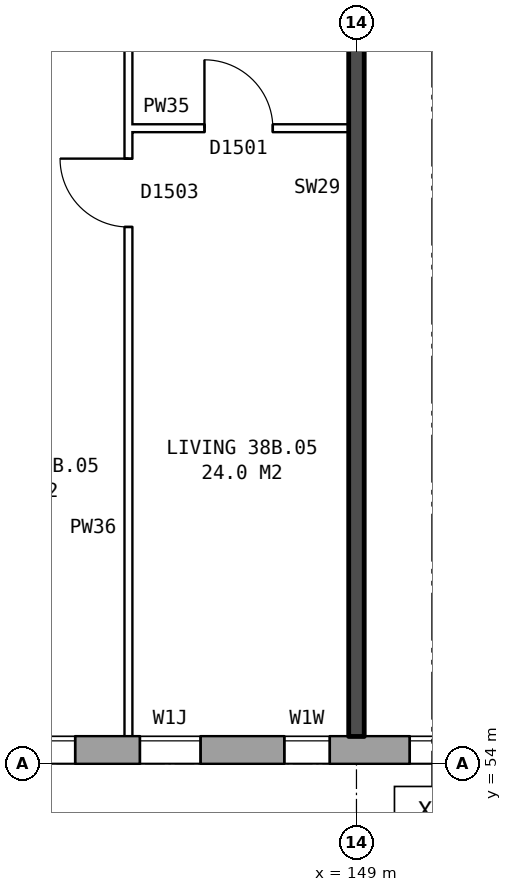
"""IFC4 building model, lengths in metres.
Left out: names, types, materials, properties, quantities, classifications, styles, units other than length and angle.
Written with IfcOpenShell. Run it as: python <this file> out.ifc"""

import sys

from ifc_helpers import new_model, si_unit, direction, frame, frame_2d, origin, place, context, subcontext, project, spatial, rectangle, extrude, element, fill, save


model = new_model("IFC4")
c1 = context("Model", 3, precision=1e-05, world=origin(), true_north=direction((0.0, 1.0)))
c2 = subcontext(c1, "Body", "Model", "MODEL_VIEW")
j1 = project(units=[si_unit("LENGTHUNIT", "METRE"), si_unit("PLANEANGLEUNIT", "RADIAN")], contexts=[c1])
p1 = place(None, origin())
s1 = spatial("IfcSite", under=j1, at=p1, CompositionType="ELEMENT")
p2 = place(p1, origin())
s2 = spatial("IfcBuilding", under=s1, at=p2, CompositionType="ELEMENT")
p3 = place(p2, frame((0.0, 0.0, 136.1)))
s3 = spatial("IfcBuildingStorey", under=s2, at=p3, CompositionType="ELEMENT", Elevation=136.1)
p4 = place(p3, frame((134.075, 54.18, 0.0), z_axis=(0.0, 0.0, 1.0), x_axis=(1.0, 0.0, 0.0)))
e1 = element("IfcWall", 1, at=p4, inside=s3, PredefinedType="STANDARD", context=c2, shape_type="SweptSolid", body=[
    extrude(rectangle(XDim=35.601, YDim=0.36, at=frame_2d((17.8, 0.0))), origin(), (0.0, 0.0, 1.0), 2.85),
])
p5 = place(p4, frame((0.625, 0.0, 0.8)))
e2 = element("IfcOpeningElement", 2, at=p5, cuts=e1, PredefinedType="OPENING", context=c2, shape_type="SweptSolid", body=[
    extrude(rectangle(XDim=1.6, YDim=1.8, at=frame_2d((0.8, 0.9))), frame((0.0, 0.19, 0.0), z_axis=(0.0, -1.0, 0.0), x_axis=(1.0, 0.0, 0.0)), (0.0, 0.0, 1.0), 0.38),
])
p6 = place(p4, frame((3.625, 0.0, 0.8)))
e3 = element("IfcOpeningElement", 3, at=p6, cuts=e1, PredefinedType="OPENING", context=c2, shape_type="SweptSolid", body=[
    extrude(rectangle(XDim=1.6, YDim=1.8, at=frame_2d((0.8, 0.9))), frame((0.0, 0.19, 0.0), z_axis=(0.0, -1.0, 0.0), x_axis=(1.0, 0.0, 0.0)), (0.0, 0.0, 1.0), 0.38),
])
p7 = place(p4, frame((6.625, 0.0, 0.8)))
e4 = element("IfcOpeningElement", 4, at=p7, cuts=e1, PredefinedType="OPENING", context=c2, shape_type="SweptSolid", body=[
    extrude(rectangle(XDim=1.6, YDim=1.8, at=frame_2d((0.8, 0.9))), frame((0.0, 0.19, 0.0), z_axis=(0.0, -1.0, 0.0), x_axis=(1.0, 0.0, 0.0)), (0.0, 0.0, 1.0), 0.38),
])
p8 = place(p4, frame((9.625, 0.0, 0.8)))
e5 = element("IfcOpeningElement", 5, at=p8, cuts=e1, PredefinedType="OPENING", context=c2, shape_type="SweptSolid", body=[
    extrude(rectangle(XDim=1.6, YDim=1.8, at=frame_2d((0.8, 0.9))), frame((0.0, 0.19, 0.0), z_axis=(0.0, -1.0, 0.0), x_axis=(1.0, 0.0, 0.0)), (0.0, 0.0, 1.0), 0.38),
])
p9 = place(p4, frame((12.075, 0.0, 1.05)))
e6 = element("IfcOpeningElement", 6, at=p9, cuts=e1, PredefinedType="OPENING", context=c2, shape_type="SweptSolid", body=[
    extrude(rectangle(XDim=0.8, YDim=1.5, at=frame_2d((0.4, 0.75))), frame((0.0, 0.19, 0.0), z_axis=(0.0, -1.0, 0.0), x_axis=(1.0, 0.0, 0.0)), (0.0, 0.0, 1.0), 0.38),
])
p10 = place(p4, frame((15.625, 0.0, 0.8)))
e7 = element("IfcOpeningElement", 7, at=p10, cuts=e1, PredefinedType="OPENING", context=c2, shape_type="SweptSolid", body=[
    extrude(rectangle(XDim=1.6, YDim=1.8, at=frame_2d((0.8, 0.9))), frame((0.0, 0.19, 0.0), z_axis=(0.0, -1.0, 0.0), x_axis=(1.0, 0.0, 0.0)), (0.0, 0.0, 1.0), 0.38),
])
p11 = place(p4, frame((18.625, 0.0, 0.8)))
e8 = element("IfcOpeningElement", 8, at=p11, cuts=e1, PredefinedType="OPENING", context=c2, shape_type="SweptSolid", body=[
    extrude(rectangle(XDim=1.6, YDim=1.8, at=frame_2d((0.8, 0.9))), frame((0.0, 0.19, 0.0), z_axis=(0.0, -1.0, 0.0), x_axis=(1.0, 0.0, 0.0)), (0.0, 0.0, 1.0), 0.38),
])
p12 = place(p4, frame((22.125, 0.0, 1.7)))
e9 = element("IfcOpeningElement", 9, at=p12, cuts=e1, PredefinedType="OPENING", context=c2, shape_type="SweptSolid", body=[
    extrude(rectangle(XDim=0.6, YDim=0.9, at=frame_2d((0.3, 0.45))), frame((0.0, 0.19, 0.0), z_axis=(0.0, -1.0, 0.0), x_axis=(1.0, 0.0, 0.0)), (0.0, 0.0, 1.0), 0.38),
])
p13 = place(p4, frame((24.625, 0.0, 0.8)))
e10 = element("IfcOpeningElement", 10, at=p13, cuts=e1, PredefinedType="OPENING", context=c2, shape_type="SweptSolid", body=[
    extrude(rectangle(XDim=1.6, YDim=1.8, at=frame_2d((0.8, 0.9))), frame((0.0, 0.19, 0.0), z_axis=(0.0, -1.0, 0.0), x_axis=(1.0, 0.0, 0.0)), (0.0, 0.0, 1.0), 0.38),
])
p14 = place(p4, frame((27.625, 0.0, 0.8)))
e11 = element("IfcOpeningElement", 11, at=p14, cuts=e1, PredefinedType="OPENING", context=c2, shape_type="SweptSolid", body=[
    extrude(rectangle(XDim=1.6, YDim=1.8, at=frame_2d((0.8, 0.9))), frame((0.0, 0.19, 0.0), z_axis=(0.0, -1.0, 0.0), x_axis=(1.0, 0.0, 0.0)), (0.0, 0.0, 1.0), 0.38),
])
p15 = place(p4, frame((30.625, 0.0, 0.8)))
e12 = element("IfcOpeningElement", 12, at=p15, cuts=e1, PredefinedType="OPENING", context=c2, shape_type="SweptSolid", body=[
    extrude(rectangle(XDim=1.6, YDim=1.8, at=frame_2d((0.8, 0.9))), frame((0.0, 0.19, 0.0), z_axis=(0.0, -1.0, 0.0), x_axis=(1.0, 0.0, 0.0)), (0.0, 0.0, 1.0), 0.38),
])
p16 = place(p4, frame((33.625, 0.0, 0.8)))
e13 = element("IfcOpeningElement", 13, at=p16, cuts=e1, PredefinedType="OPENING", context=c2, shape_type="SweptSolid", body=[
    extrude(rectangle(XDim=1.6, YDim=1.8, at=frame_2d((0.8, 0.9))), frame((0.0, 0.19, 0.0), z_axis=(0.0, -1.0, 0.0), x_axis=(1.0, 0.0, 0.0)), (0.0, 0.0, 1.0), 0.38),
])
p17 = place(p4, frame((13.975, 0.0, 0.15)))
e14 = element("IfcOpeningElement", 14, at=p17, cuts=e1, PredefinedType="OPENING", context=c2, shape_type="SweptSolid", body=[
    extrude(rectangle(XDim=0.6, YDim=0.9, at=frame_2d((0.3, 0.45))), frame((0.0, 0.19, 0.0), z_axis=(0.0, -1.0, 0.0), x_axis=(1.0, 0.0, 0.0)), (0.0, 0.0, 1.0), 0.38),
])
p18 = place(p4, frame((23.025, 0.0, 0.8)))
e15 = element("IfcOpeningElement", 15, at=p18, cuts=e1, PredefinedType="OPENING", context=c2, shape_type="SweptSolid", body=[
    extrude(rectangle(XDim=1.2, YDim=1.8, at=frame_2d((0.6, 0.9))), frame((0.0, 0.19, 0.0), z_axis=(0.0, -1.0, 0.0), x_axis=(1.0, 0.0, 0.0)), (0.0, 0.0, 1.0), 0.38),
])
p19 = place(p3, frame((146.0, 62.36, 0.0), z_axis=(0.0, 0.0, 1.0), x_axis=(1.0, 0.0, 0.0)))
e16 = element("IfcWall", 16, at=p19, inside=s3, PredefinedType="PARTITIONING", context=c2, shape_type="SweptSolid", body=[
    extrude(rectangle(XDim=2.9, YDim=0.1, at=frame_2d((1.45, 0.0))), origin(), (0.0, 0.0, 1.0), 2.85),
])
p20 = place(p19, frame((1.0, 0.0, 0.0)))
e17 = element("IfcOpeningElement", 17, at=p20, cuts=e16, PredefinedType="OPENING", context=c2, shape_type="SweptSolid", body=[
    extrude(rectangle(XDim=0.9, YDim=2.1, at=frame_2d((0.45, 1.05))), frame((0.0, 0.06, 0.0), z_axis=(0.0, -1.0, 0.0), x_axis=(1.0, 0.0, 0.0)), (0.0, 0.0, 1.0), 0.12),
])
p21 = place(p3, frame((146.0, 54.36, 0.0), z_axis=(0.0, 0.0, 1.0), x_axis=(0.0, 1.0, 0.0)))
e18 = element("IfcWall", 18, at=p21, inside=s3, PredefinedType="PARTITIONING", context=c2, shape_type="SweptSolid", body=[
    extrude(rectangle(XDim=14.34, YDim=0.1, at=frame_2d((7.17, 0.0))), origin(), (0.0, 0.0, 1.0), 2.85),
])
p22 = place(p21, frame((6.7, 0.0, 0.0)))
e19 = element("IfcOpeningElement", 19, at=p22, cuts=e18, PredefinedType="OPENING", context=c2, shape_type="SweptSolid", body=[
    extrude(rectangle(XDim=0.9, YDim=2.1, at=frame_2d((0.45, 1.05))), frame((0.0, 0.06, 0.0), z_axis=(0.0, -1.0, 0.0), x_axis=(1.0, 0.0, 0.0)), (0.0, 0.0, 1.0), 0.12),
])
p23 = place(p21, frame((13.04, 0.0, 0.0)))
e20 = element("IfcOpeningElement", 20, at=p23, cuts=e18, PredefinedType="OPENING", context=c2, shape_type="SweptSolid", body=[
    extrude(rectangle(XDim=0.9, YDim=2.1, at=frame_2d((0.45, 1.05))), frame((0.0, 0.06, 0.0), z_axis=(0.0, -1.0, 0.0), x_axis=(1.0, 0.0, 0.0)), (0.0, 0.0, 1.0), 0.12),
])
p24 = place(p3, frame((149.0, 54.36, 0.0), z_axis=(0.0, 0.0, 1.0), x_axis=(0.0, 1.0, 0.0)))
e21 = element("IfcWall", 21, at=p24, inside=s3, PredefinedType="SOLIDWALL", context=c2, shape_type="SweptSolid", body=[
    extrude(rectangle(XDim=14.44, YDim=0.2, at=frame_2d((7.22, 0.0))), origin(), (0.0, 0.0, 1.0), 2.85),
])
p25 = place(p8, origin())
e22 = element("IfcWindow", 22, at=p25, inside=s3, PartitioningType="SINGLE_PANEL", PredefinedType="WINDOW", context=c2, shape_type="SweptSolid", body=[
    extrude(rectangle(XDim=1.6, YDim=1.8, at=frame_2d((0.8, 0.9))), frame((0.0, 0.15, 0.0), z_axis=(0.0, -1.0, 0.0), x_axis=(1.0, 0.0, 0.0)), (0.0, 0.0, 1.0), 0.06),
])
fill(e5, e22)
p26 = place(p9, origin())
e23 = element("IfcWindow", 23, at=p26, inside=s3, PartitioningType="SINGLE_PANEL", PredefinedType="WINDOW", context=c2, shape_type="SweptSolid", body=[
    extrude(rectangle(XDim=0.8, YDim=1.5, at=frame_2d((0.4, 0.75))), frame((0.0, 0.15, 0.0), z_axis=(0.0, -1.0, 0.0), x_axis=(1.0, 0.0, 0.0)), (0.0, 0.0, 1.0), 0.06),
])
fill(e6, e23)
p27 = place(p10, origin())
e24 = element("IfcWindow", 24, at=p27, inside=s3, PartitioningType="SINGLE_PANEL", PredefinedType="WINDOW", context=c2, shape_type="SweptSolid", body=[
    extrude(rectangle(XDim=1.6, YDim=1.8, at=frame_2d((0.8, 0.9))), frame((0.0, 0.15, 0.0), z_axis=(0.0, -1.0, 0.0), x_axis=(1.0, 0.0, 0.0)), (0.0, 0.0, 1.0), 0.06),
])
fill(e7, e24)
p28 = place(p22, origin())
e25 = element("IfcDoor", 25, at=p28, inside=s3, OperationType="SINGLE_SWING_RIGHT", PredefinedType="DOOR", context=c2, shape_type="SweptSolid", body=[
    extrude(rectangle(XDim=0.9, YDim=2.1, at=frame_2d((0.45, 1.05))), frame((0.0, 0.025, 0.0), z_axis=(0.0, -1.0, 0.0), x_axis=(1.0, 0.0, 0.0)), (0.0, 0.0, 1.0), 0.05),
])
fill(e19, e25)
p29 = place(p20, origin())
e26 = element("IfcDoor", 26, at=p29, inside=s3, OperationType="SINGLE_SWING_LEFT", PredefinedType="DOOR", context=c2, shape_type="SweptSolid", body=[
    extrude(rectangle(XDim=0.9, YDim=2.1, at=frame_2d((0.45, 1.05))), frame((0.0, 0.025, 0.0), z_axis=(0.0, -1.0, 0.0), x_axis=(1.0, 0.0, 0.0)), (0.0, 0.0, 1.0), 0.05),
])
fill(e17, e26)
p30 = place(p17, origin())
e27 = element("IfcWindow", 27, at=p30, inside=s3, PartitioningType="SINGLE_PANEL", PredefinedType="WINDOW", context=c2, shape_type="SweptSolid", body=[
    extrude(rectangle(XDim=0.6, YDim=0.9, at=frame_2d((0.3, 0.45))), frame((0.0, 0.15, 0.0), z_axis=(0.0, -1.0, 0.0), x_axis=(1.0, 0.0, 0.0)), (0.0, 0.0, 1.0), 0.06),
])
fill(e14, e27)
save(model, sys.argv[1])
